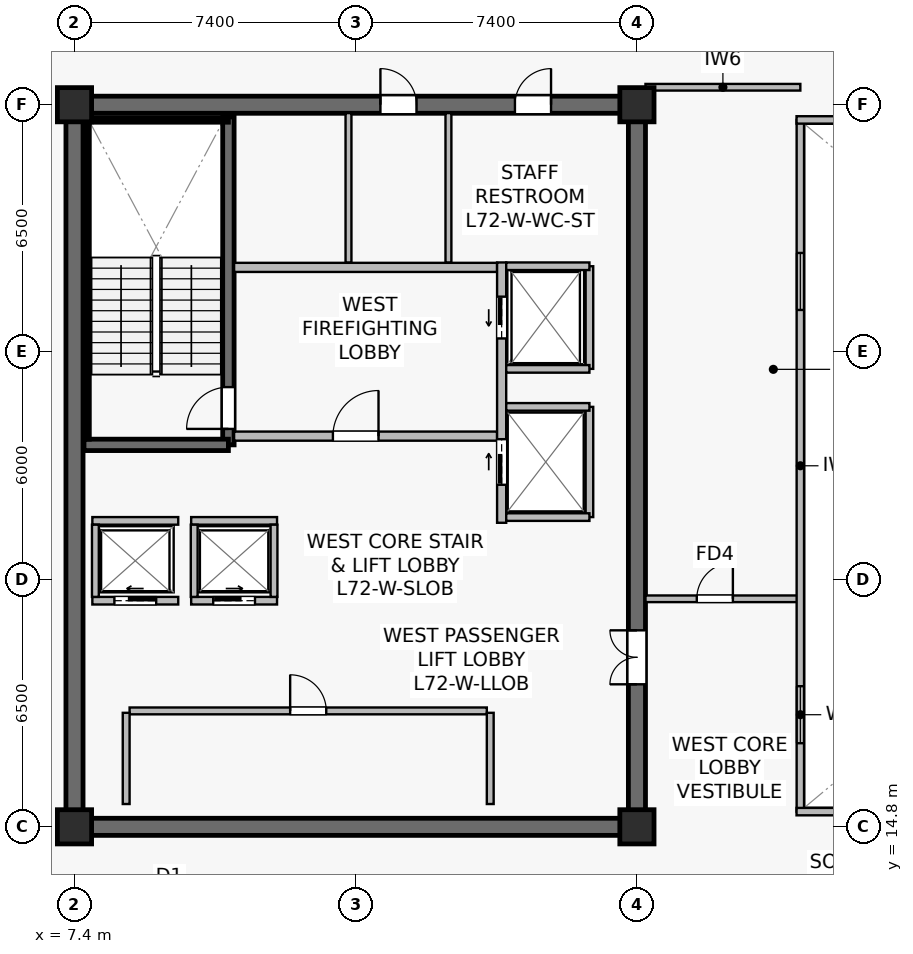
"""IFC4 building model, lengths in metres.
Left out: names, types, materials, properties, quantities, classifications, styles, units other than length and angle.
Written with IfcOpenShell. Run it as: python <this file> out.ifc"""

import sys

from ifc_helpers import new_model, si_unit, direction, frame, frame_2d, origin, origin_2d, place, context, subcontext, project, spatial, rectangle, extrude, source, transform, mapped, element, fill, save


model = new_model("IFC4")
c1 = context("Model", 3, precision=1e-05, world=origin(), true_north=direction((0.0, 1.0)))
c2 = subcontext(c1, "Body", "Model", "MODEL_VIEW")
j1 = project(units=[si_unit("LENGTHUNIT", "METRE"), si_unit("PLANEANGLEUNIT", "RADIAN")], contexts=[c1])
p1 = place(None, origin())
s1 = spatial("IfcSite", under=j1, at=p1, CompositionType="ELEMENT")
p2 = place(p1, origin())
s2 = spatial("IfcBuilding", under=s1, at=p2, CompositionType="ELEMENT")
p3 = place(p2, frame((0.0, 0.0, 301.8)))
s3 = spatial("IfcBuildingStorey", under=s2, at=p3, CompositionType="ELEMENT", Elevation=301.8)
p4 = place(p3, frame((7.175, 14.8, 0.0), z_axis=(0.0, 0.0, 1.0), x_axis=(1.0, 0.0, 0.0)))
e1 = element("IfcWall", 1, at=p4, inside=s3, PredefinedType="SHEAR", context=c2, shape_type="SweptSolid", body=[
    extrude(rectangle(XDim=15.25, YDim=0.45, at=frame_2d((7.625, 0.0))), origin(), (0.0, 0.0, 1.0), 3.9),
])
p5 = place(p3, frame((7.175, 33.8, 0.0), z_axis=(0.0, 0.0, 1.0), x_axis=(1.0, 0.0, 0.0)))
e2 = element("IfcWall", 2, at=p5, inside=s3, PredefinedType="SHEAR", context=c2, shape_type="SweptSolid", body=[
    extrude(rectangle(XDim=15.25, YDim=0.45, at=frame_2d((7.625, 0.0))), origin(), (0.0, 0.0, 1.0), 3.9),
])
p6 = place(p5, frame((8.275, 0.0, 0.0)))
e3 = element("IfcOpeningElement", 3, at=p6, cuts=e2, PredefinedType="OPENING", context=c2, shape_type="SweptSolid", body=[
    extrude(rectangle(XDim=0.95, YDim=2.15, at=frame_2d((0.475, 1.075))), frame((0.0, 0.235, 0.0), z_axis=(0.0, -1.0, 0.0), x_axis=(1.0, 0.0, 0.0)), (0.0, 0.0, 1.0), 0.47),
])
p7 = place(p5, frame((11.815, 0.0, 0.0)))
e4 = element("IfcOpeningElement", 4, at=p7, cuts=e2, PredefinedType="OPENING", context=c2, shape_type="SweptSolid", body=[
    extrude(rectangle(XDim=0.95, YDim=2.15, at=frame_2d((0.475, 1.075))), frame((0.0, 0.235, 0.0), z_axis=(0.0, -1.0, 0.0), x_axis=(1.0, 0.0, 0.0)), (0.0, 0.0, 1.0), 0.47),
])
p8 = place(p3, frame((7.4, 15.025, 0.0), z_axis=(0.0, 0.0, 1.0), x_axis=(0.0, 1.0, 0.0)))
e5 = element("IfcWall", 5, at=p8, inside=s3, PredefinedType="SHEAR", context=c2, shape_type="SweptSolid", body=[
    extrude(rectangle(XDim=18.55, YDim=0.45, at=frame_2d((9.275, 0.0))), origin(), (0.0, 0.0, 1.0), 3.9),
])
p9 = place(p3, frame((22.2, 15.025, 0.0), z_axis=(0.0, 0.0, 1.0), x_axis=(0.0, 1.0, 0.0)))
e6 = element("IfcWall", 6, at=p9, inside=s3, PredefinedType="SHEAR", context=c2, shape_type="SweptSolid", body=[
    extrude(rectangle(XDim=18.55, YDim=0.45, at=frame_2d((9.275, 0.0))), origin(), (0.0, 0.0, 1.0), 3.9),
])
p10 = place(p9, frame((3.525, 0.0, 0.0)))
e7 = element("IfcOpeningElement", 7, at=p10, cuts=e6, PredefinedType="OPENING", context=c2, shape_type="SweptSolid", body=[
    extrude(rectangle(XDim=1.42, YDim=2.2, at=frame_2d((0.71, 1.1))), frame((0.0, 0.235, 0.0), z_axis=(0.0, -1.0, 0.0), x_axis=(1.0, 0.0, 0.0)), (0.0, 0.0, 1.0), 0.47),
])
p11 = place(p3, frame((11.45, 24.85, 0.0), z_axis=(0.0, 0.0, 1.0), x_axis=(0.0, 1.0, 0.0)))
e8 = element("IfcWall", 8, at=p11, inside=s3, PredefinedType="SHEAR", context=c2, shape_type="SweptSolid", body=[
    extrude(rectangle(XDim=8.63, YDim=0.3, at=frame_2d((4.315, 0.0))), origin(), (0.0, 0.0, 1.0), 3.9),
])
p12 = place(p11, frame((0.42, 0.0, 0.0)))
e9 = element("IfcOpeningElement", 9, at=p12, cuts=e8, PredefinedType="OPENING", context=c2, shape_type="SweptSolid", body=[
    extrude(rectangle(XDim=1.1, YDim=2.15, at=frame_2d((0.55, 1.075))), frame((0.0, 0.16, 0.0), z_axis=(0.0, -1.0, 0.0), x_axis=(1.0, 0.0, 0.0)), (0.0, 0.0, 1.0), 0.32),
])
p13 = place(p3, frame((7.65, 24.85, 0.0), z_axis=(0.0, 0.0, 1.0), x_axis=(1.0, 0.0, 0.0)))
e10 = element("IfcWall", 10, at=p13, inside=s3, PredefinedType="SHEAR", context=c2, shape_type="SweptSolid", body=[
    extrude(rectangle(XDim=3.8, YDim=0.3, at=frame_2d((1.9, 0.0))), origin(), (0.0, 0.0, 1.0), 3.9),
])
p14 = place(p3, frame((7.73, 33.4, 0.0), z_axis=(0.0, 0.0, 1.0), x_axis=(1.0, 0.0, 0.0)))
e11 = element("IfcWall", 11, at=p14, inside=s3, PredefinedType="SOLIDWALL", context=c2, shape_type="SweptSolid", body=[
    extrude(rectangle(XDim=3.72, YDim=0.12, at=frame_2d((1.86, 0.0))), origin(), (0.0, 0.0, 1.0), 3.9),
])
p15 = place(p3, frame((7.73, 25.0, 0.0), z_axis=(0.0, 0.0, 1.0), x_axis=(0.0, 1.0, 0.0)))
e12 = element("IfcWall", 12, at=p15, inside=s3, PredefinedType="SOLIDWALL", context=c2, shape_type="SweptSolid", body=[
    extrude(rectangle(XDim=8.32, YDim=0.12, at=frame_2d((4.16, 0.0))), origin(), (0.0, 0.0, 1.0), 3.9),
])
m1 = source(origin(), c2, "Body", "SweptSolid", [
    extrude(rectangle(XDim=0.9, YDim=0.9, at=origin_2d()), origin(), (0.0, 0.0, 1.0), 4.2),
])
for number, where, z_axis, x_axis in (
    (13, (7.4, 14.8, 0.0), (0.0, 0.0, 1.0), (1.0, 0.0, 0.0)),
    (14, (22.2, 14.8, 0.0), (0.0, 0.0, 1.0), (1.0, 0.0, 0.0)),
    (15, (7.4, 33.8, 0.0), (0.0, 0.0, 1.0), (1.0, 0.0, 0.0)),
    (16, (22.2, 33.8, 0.0), (0.0, 0.0, 1.0), (1.0, 0.0, 0.0)),
):
    element("IfcColumn", number, at=place(p3, frame(where, z_axis=z_axis, x_axis=x_axis)), inside=s3, PredefinedType="COLUMN", context=c2, shape_type="MappedRepresentation", body=[
        mapped(m1, transform((0.0, 0.0, 0.0), scale=1.0)),
    ])
p16 = place(p3, frame((11.6, 25.08, 0.0), z_axis=(0.0, 0.0, 1.0), x_axis=(1.0, 0.0, 0.0)))
e17 = element("IfcWall", 17, at=p16, inside=s3, PredefinedType="SOLIDWALL", context=c2, shape_type="SweptSolid", body=[
    extrude(rectangle(XDim=6.92, YDim=0.24, at=frame_2d((3.46, 0.0))), origin(), (0.0, 0.0, 1.0), 3.297),
])
p17 = place(p16, frame((2.6, 0.0, 0.0)))
e18 = element("IfcOpeningElement", 18, at=p17, cuts=e17, PredefinedType="OPENING", context=c2, shape_type="SweptSolid", body=[
    extrude(rectangle(XDim=1.2, YDim=2.16, at=frame_2d((0.6, 1.08))), frame((0.0, 0.13, 0.0), z_axis=(0.0, -1.0, 0.0), x_axis=(1.0, 0.0, 0.0)), (0.0, 0.0, 1.0), 0.26),
])
p18 = place(p3, frame((11.6, 29.52, 0.0), z_axis=(0.0, 0.0, 1.0), x_axis=(1.0, 0.0, 0.0)))
e19 = element("IfcWall", 19, at=p18, inside=s3, PredefinedType="SOLIDWALL", context=c2, shape_type="SweptSolid", body=[
    extrude(rectangle(XDim=6.92, YDim=0.24, at=frame_2d((3.46, 0.0))), origin(), (0.0, 0.0, 1.0), 3.297),
])
p19 = place(p3, frame((18.64, 22.8, 0.0), z_axis=(0.0, 0.0, 1.0), x_axis=(0.0, 1.0, 0.0)))
e20 = element("IfcWall", 20, at=p19, inside=s3, PredefinedType="SOLIDWALL", context=c2, shape_type="SweptSolid", body=[
    extrude(rectangle(XDim=6.85, YDim=0.24, at=frame_2d((3.425, 0.0))), origin(), (0.0, 0.0, 1.0), 3.035),
])
p20 = place(p19, frame((4.85, 0.0, 0.0)))
e21 = element("IfcOpeningElement", 21, at=p20, cuts=e20, PredefinedType="OPENING", context=c2, shape_type="SweptSolid", body=[
    extrude(rectangle(XDim=1.1, YDim=2.22, at=frame_2d((0.55, 1.11))), frame((0.0, 0.13, 0.0), z_axis=(0.0, -1.0, 0.0), x_axis=(1.0, 0.0, 0.0)), (0.0, 0.0, 1.0), 0.26),
])
p21 = place(p19, frame((1.0, 0.0, 0.0)))
e22 = element("IfcOpeningElement", 22, at=p21, cuts=e20, PredefinedType="OPENING", context=c2, shape_type="SweptSolid", body=[
    extrude(rectangle(XDim=1.2, YDim=2.22, at=frame_2d((0.6, 1.11))), frame((0.0, 0.13, 0.0), z_axis=(0.0, -1.0, 0.0), x_axis=(1.0, 0.0, 0.0)), (0.0, 0.0, 1.0), 0.26),
])
p22 = place(p3, frame((7.87, 20.75, 0.0), z_axis=(0.0, 0.0, 1.0), x_axis=(1.0, 0.0, 0.0)))
e23 = element("IfcWall", 23, at=p22, inside=s3, PredefinedType="SOLIDWALL", context=c2, shape_type="SweptSolid", body=[
    extrude(rectangle(XDim=2.26, YDim=0.2, at=frame_2d((1.13, 0.0))), origin(), (0.0, 0.0, 1.0), 3.9),
])
p23 = place(p22, frame((0.58, 0.0, 0.0)))
e24 = element("IfcOpeningElement", 24, at=p23, cuts=e23, PredefinedType="OPENING", context=c2, shape_type="SweptSolid", body=[
    extrude(rectangle(XDim=1.1, YDim=2.22, at=frame_2d((0.55, 1.11))), frame((0.0, 0.11, 0.0), z_axis=(0.0, -1.0, 0.0), x_axis=(1.0, 0.0, 0.0)), (0.0, 0.0, 1.0), 0.22),
])
p24 = place(p3, frame((7.87, 22.85, 0.0), z_axis=(0.0, 0.0, 1.0), x_axis=(1.0, 0.0, 0.0)))
e25 = element("IfcWall", 25, at=p24, inside=s3, PredefinedType="SOLIDWALL", context=c2, shape_type="SweptSolid", body=[
    extrude(rectangle(XDim=2.26, YDim=0.2, at=frame_2d((1.13, 0.0))), origin(), (0.0, 0.0, 1.0), 3.9),
])
p25 = place(p3, frame((7.95, 20.85, 0.0), z_axis=(0.0, 0.0, 1.0), x_axis=(0.0, 1.0, 0.0)))
e26 = element("IfcWall", 26, at=p25, inside=s3, PredefinedType="SOLIDWALL", context=c2, shape_type="SweptSolid", body=[
    extrude(rectangle(XDim=1.9, YDim=0.18, at=frame_2d((0.95, 0.0))), origin(), (0.0, 0.0, 1.0), 3.9),
])
p26 = place(p3, frame((10.47, 20.75, 0.0), z_axis=(0.0, 0.0, 1.0), x_axis=(1.0, 0.0, 0.0)))
e27 = element("IfcWall", 27, at=p26, inside=s3, PredefinedType="SOLIDWALL", context=c2, shape_type="SweptSolid", body=[
    extrude(rectangle(XDim=2.26, YDim=0.2, at=frame_2d((1.13, 0.0))), origin(), (0.0, 0.0, 1.0), 3.9),
])
p27 = place(p26, frame((0.58, 0.0, 0.0)))
e28 = element("IfcOpeningElement", 28, at=p27, cuts=e27, PredefinedType="OPENING", context=c2, shape_type="SweptSolid", body=[
    extrude(rectangle(XDim=1.1, YDim=2.22, at=frame_2d((0.55, 1.11))), frame((0.0, 0.11, 0.0), z_axis=(0.0, -1.0, 0.0), x_axis=(1.0, 0.0, 0.0)), (0.0, 0.0, 1.0), 0.22),
])
p28 = place(p3, frame((10.47, 22.85, 0.0), z_axis=(0.0, 0.0, 1.0), x_axis=(1.0, 0.0, 0.0)))
e29 = element("IfcWall", 29, at=p28, inside=s3, PredefinedType="SOLIDWALL", context=c2, shape_type="SweptSolid", body=[
    extrude(rectangle(XDim=2.26, YDim=0.2, at=frame_2d((1.13, 0.0))), origin(), (0.0, 0.0, 1.0), 3.9),
])
for number, where, z_axis, x_axis in (
    (30, (10.55, 20.85, 0.0), (0.0, 0.0, 1.0), (0.0, 1.0, 0.0)),
    (31, (12.65, 20.85, 0.0), (0.0, 0.0, 1.0), (0.0, 1.0, 0.0)),
):
    element("IfcWall", number, at=place(p3, frame(where, z_axis=z_axis, x_axis=x_axis)), inside=s3, PredefinedType="SOLIDWALL", context=c2, shape_type="SweptSolid", body=[
        extrude(rectangle(XDim=1.9, YDim=0.18, at=frame_2d((0.95, 0.0))), origin(), (0.0, 0.0, 1.0), 3.9),
    ])
p29 = place(p3, frame((20.95, 26.85, 0.0), z_axis=(0.0, 0.0, 1.0), x_axis=(0.0, 1.0, 0.0)))
e32 = element("IfcWall", 32, at=p29, inside=s3, PredefinedType="SOLIDWALL", context=c2, shape_type="SweptSolid", body=[
    extrude(rectangle(XDim=2.7, YDim=0.2, at=frame_2d((1.35, 0.0))), origin(), (0.0, 0.0, 1.0), 3.9),
])
p30 = place(p3, frame((18.76, 29.55, 0.0), z_axis=(0.0, 0.0, 1.0), x_axis=(1.0, 0.0, 0.0)))
e33 = element("IfcWall", 33, at=p30, inside=s3, PredefinedType="SOLIDWALL", context=c2, shape_type="SweptSolid", body=[
    extrude(rectangle(XDim=2.19, YDim=0.2, at=frame_2d((1.095, 0.0))), origin(), (0.0, 0.0, 1.0), 3.9),
])
p31 = place(p3, frame((18.76, 26.85, 0.0), z_axis=(0.0, 0.0, 1.0), x_axis=(1.0, 0.0, 0.0)))
e34 = element("IfcWall", 34, at=p31, inside=s3, PredefinedType="SOLIDWALL", context=c2, shape_type="SweptSolid", body=[
    extrude(rectangle(XDim=2.19, YDim=0.2, at=frame_2d((1.095, 0.0))), origin(), (0.0, 0.0, 1.0), 3.297),
])
p32 = place(p3, frame((20.95, 22.95, 0.0), z_axis=(0.0, 0.0, 1.0), x_axis=(0.0, 1.0, 0.0)))
e35 = element("IfcWall", 35, at=p32, inside=s3, PredefinedType="SOLIDWALL", context=c2, shape_type="SweptSolid", body=[
    extrude(rectangle(XDim=2.9, YDim=0.2, at=frame_2d((1.45, 0.0))), origin(), (0.0, 0.0, 1.0), 3.035),
])
for number, where, z_axis, x_axis in (
    (36, (18.76, 25.85, 0.0), (0.0, 0.0, 1.0), (1.0, 0.0, 0.0)),
    (37, (18.76, 22.95, 0.0), (0.0, 0.0, 1.0), (1.0, 0.0, 0.0)),
):
    element("IfcWall", number, at=place(p3, frame(where, z_axis=z_axis, x_axis=x_axis)), inside=s3, PredefinedType="SOLIDWALL", context=c2, shape_type="SweptSolid", body=[
        extrude(rectangle(XDim=2.19, YDim=0.2, at=frame_2d((1.095, 0.0))), origin(), (0.0, 0.0, 1.0), 3.9),
    ])
p33 = place(p3, frame((8.85, 17.85, 0.0), z_axis=(0.0, 0.0, 1.0), x_axis=(1.0, 0.0, 0.0)))
e38 = element("IfcWall", 38, at=p33, inside=s3, PredefinedType="SOLIDWALL", context=c2, shape_type="SweptSolid", body=[
    extrude(rectangle(XDim=9.4, YDim=0.18, at=frame_2d((4.7, 0.0))), origin(), (0.0, 0.0, 1.0), 3.297),
])
p34 = place(p33, frame((4.225, 0.0, 0.0)))
e39 = element("IfcOpeningElement", 39, at=p34, cuts=e38, PredefinedType="OPENING", context=c2, shape_type="SweptSolid", body=[
    extrude(rectangle(XDim=0.95, YDim=2.15, at=frame_2d((0.475, 1.075))), frame((0.0, 0.1, 0.0), z_axis=(0.0, -1.0, 0.0), x_axis=(1.0, 0.0, 0.0)), (0.0, 0.0, 1.0), 0.2),
])
for number, where, z_axis, x_axis in (
    (40, (18.34, 15.4, 0.0), (0.0, 0.0, 1.0), (0.0, 1.0, 0.0)),
    (41, (8.76, 15.4, 0.0), (0.0, 0.0, 1.0), (0.0, 1.0, 0.0)),
):
    element("IfcWall", number, at=place(p3, frame(where, z_axis=z_axis, x_axis=x_axis)), inside=s3, PredefinedType="SOLIDWALL", context=c2, shape_type="SweptSolid", body=[
        extrude(rectangle(XDim=2.4, YDim=0.18, at=frame_2d((1.2, 0.0))), origin(), (0.0, 0.0, 1.0), 3.9),
    ])
p35 = place(p3, frame((14.61, 29.65, 0.0), z_axis=(0.0, 0.0, 1.0), x_axis=(0.0, 1.0, 0.0)))
e42 = element("IfcWall", 42, at=p35, inside=s3, PredefinedType="PLUMBINGWALL", context=c2, shape_type="SweptSolid", body=[
    extrude(rectangle(XDim=3.93, YDim=0.155, at=frame_2d((1.965, 0.0))), origin(), (0.0, 0.0, 1.0), 3.297),
])
p36 = place(p3, frame((17.24, 29.65, 0.0), z_axis=(0.0, 0.0, 1.0), x_axis=(0.0, 1.0, 0.0)))
e43 = element("IfcWall", 43, at=p36, inside=s3, PredefinedType="PLUMBINGWALL", context=c2, shape_type="SweptSolid", body=[
    extrude(rectangle(XDim=3.93, YDim=0.155, at=frame_2d((1.965, 0.0))), origin(), (0.0, 0.0, 1.0), 3.9),
])
p37 = place(p3, frame((22.425, 34.26, 0.0), z_axis=(0.0, 0.0, 1.0), x_axis=(1.0, 0.0, 0.0)))
e44 = element("IfcWall", 44, at=p37, inside=s3, PredefinedType="PARTITIONING", context=c2, shape_type="SweptSolid", body=[
    extrude(rectangle(XDim=4.075, YDim=0.175, at=frame_2d((2.038, 0.0))), origin(), (0.0, 0.0, 1.0), 3.635),
])
p38 = place(p3, frame((22.425, 20.8, 0.0), z_axis=(0.0, 0.0, 1.0), x_axis=(1.0, 0.0, 0.0)))
e45 = element("IfcWall", 45, at=p38, inside=s3, PredefinedType="PARTITIONING", context=c2, shape_type="SweptSolid", body=[
    extrude(rectangle(XDim=4.075, YDim=0.175, at=frame_2d((2.038, 0.0))), origin(), (0.0, 0.0, 1.0), 3.9),
])
p39 = place(p38, frame((1.35, 0.0, 0.0)))
e46 = element("IfcOpeningElement", 46, at=p39, cuts=e45, PredefinedType="OPENING", context=c2, shape_type="SweptSolid", body=[
    extrude(rectangle(XDim=0.95, YDim=2.15, at=frame_2d((0.475, 1.075))), frame((0.0, 0.098, 0.0), z_axis=(0.0, -1.0, 0.0), x_axis=(1.0, 0.0, 0.0)), (0.0, 0.0, 1.0), 0.195),
])
p40 = place(p3, frame((26.5, 15.2, 0.0), z_axis=(0.0, 0.0, 1.0), x_axis=(0.0, 1.0, 0.0)))
e47 = element("IfcWall", 47, at=p40, inside=s3, PredefinedType="SOLIDWALL", context=c2, shape_type="SweptSolid", body=[
    extrude(rectangle(XDim=18.2, YDim=0.195, at=frame_2d((9.1, 0.0))), origin(), (0.0, 0.0, 1.0), 3.9),
])
p41 = place(p40, frame((1.8, 0.0, 0.9)))
e48 = element("IfcOpeningElement", 48, at=p41, cuts=e47, PredefinedType="OPENING", context=c2, shape_type="SweptSolid", body=[
    extrude(rectangle(XDim=1.5, YDim=1.4, at=frame_2d((0.75, 0.7))), frame((0.0, 0.107, 0.0), z_axis=(0.0, -1.0, 0.0), x_axis=(1.0, 0.0, 0.0)), (0.0, 0.0, 1.0), 0.215),
])
p42 = place(p40, frame((13.2, 0.0, 0.9)))
e49 = element("IfcOpeningElement", 49, at=p42, cuts=e47, PredefinedType="OPENING", context=c2, shape_type="SweptSolid", body=[
    extrude(rectangle(XDim=1.5, YDim=1.4, at=frame_2d((0.75, 0.7))), frame((0.0, 0.107, 0.0), z_axis=(0.0, -1.0, 0.0), x_axis=(1.0, 0.0, 0.0)), (0.0, 0.0, 1.0), 0.215),
])
for number, where, z_axis, x_axis in (
    (50, (26.4, 15.2, 0.0), (0.0, 0.0, 1.0), (1.0, 0.0, 0.0)),
    (51, (26.4, 33.4, 0.0), (0.0, 0.0, 1.0), (1.0, 0.0, 0.0)),
):
    element("IfcWall", number, at=place(p3, frame(where, z_axis=z_axis, x_axis=x_axis)), inside=s3, PredefinedType="SOLIDWALL", context=c2, shape_type="SweptSolid", body=[
        extrude(rectangle(XDim=22.0, YDim=0.195, at=frame_2d((11.0, 0.0))), origin(), (0.0, 0.0, 1.0), 3.9),
    ])
m2 = source(origin(), c2, "Body", "SweptSolid", [
    extrude(rectangle(XDim=1.5, YDim=1.4, at=frame_2d((0.75, 0.7))), frame((0.0, 0.03, 0.0), z_axis=(0.0, -1.0, 0.0), x_axis=(1.0, 0.0, 0.0)), (0.0, 0.0, 1.0), 0.06),
])
p43 = place(p41, origin())
e52 = element("IfcWindow", 52, at=p43, inside=s3, PartitioningType="SINGLE_PANEL", PredefinedType="WINDOW", context=c2, shape_type="MappedRepresentation", body=[
    mapped(m2, transform((0.0, 0.0, 0.0), scale=1.0)),
])
fill(e48, e52)
p44 = place(p42, origin())
e53 = element("IfcWindow", 53, at=p44, inside=s3, PartitioningType="SINGLE_PANEL", PredefinedType="WINDOW", context=c2, shape_type="MappedRepresentation", body=[
    mapped(m2, transform((0.0, 0.0, 0.0), scale=1.0)),
])
fill(e49, e53)
m3 = source(origin(), c2, "Body", "SweptSolid", [
    extrude(rectangle(XDim=1.1, YDim=2.15, at=frame_2d((0.55, 1.075))), frame((0.0, 0.025, 0.0), z_axis=(0.0, -1.0, 0.0), x_axis=(1.0, 0.0, 0.0)), (0.0, 0.0, 1.0), 0.05),
])
p45 = place(p12, origin())
e54 = element("IfcDoor", 54, at=p45, inside=s3, OperationType="SINGLE_SWING_LEFT", PredefinedType="DOOR", context=c2, shape_type="MappedRepresentation", body=[
    mapped(m3, transform((0.0, 0.0, 0.0), scale=1.0)),
])
fill(e9, e54)
m4 = source(origin(), c2, "Body", "SweptSolid", [
    extrude(rectangle(XDim=1.2, YDim=2.16, at=frame_2d((0.6, 1.08))), frame((0.0, 0.025, 0.0), z_axis=(0.0, -1.0, 0.0), x_axis=(1.0, 0.0, 0.0)), (0.0, 0.0, 1.0), 0.05),
])
p46 = place(p17, origin())
e55 = element("IfcDoor", 55, at=p46, inside=s3, OperationType="SINGLE_SWING_RIGHT", PredefinedType="DOOR", context=c2, shape_type="MappedRepresentation", body=[
    mapped(m4, transform((0.0, 0.0, 0.0), scale=1.0)),
])
fill(e18, e55)
m5 = source(origin(), c2, "Body", "SweptSolid", [
    extrude(rectangle(XDim=1.1, YDim=2.22, at=frame_2d((0.55, 1.11))), frame((0.0, 0.025, 0.0), z_axis=(0.0, -1.0, 0.0), x_axis=(1.0, 0.0, 0.0)), (0.0, 0.0, 1.0), 0.05),
])
p47 = place(p23, origin())
e56 = element("IfcDoor", 56, at=p47, inside=s3, OperationType="SLIDING_TO_LEFT", PredefinedType="USERDEFINED", context=c2, shape_type="MappedRepresentation", body=[
    mapped(m5, transform((0.0, 0.0, 0.0), scale=1.0)),
])
fill(e24, e56)
p48 = place(p27, origin())
e57 = element("IfcDoor", 57, at=p48, inside=s3, OperationType="SLIDING_TO_RIGHT", PredefinedType="USERDEFINED", context=c2, shape_type="MappedRepresentation", body=[
    mapped(m5, transform((0.0, 0.0, 0.0), scale=1.0)),
])
fill(e28, e57)
p49 = place(p20, origin())
e58 = element("IfcDoor", 58, at=p49, inside=s3, OperationType="SLIDING_TO_LEFT", PredefinedType="USERDEFINED", context=c2, shape_type="MappedRepresentation", body=[
    mapped(m5, transform((0.0, 0.0, 0.0), scale=1.0)),
])
fill(e21, e58)
m6 = source(origin(), c2, "Body", "SweptSolid", [
    extrude(rectangle(XDim=1.2, YDim=2.22, at=frame_2d((0.6, 1.11))), frame((0.0, 0.025, 0.0), z_axis=(0.0, -1.0, 0.0), x_axis=(1.0, 0.0, 0.0)), (0.0, 0.0, 1.0), 0.05),
])
p50 = place(p21, origin())
e59 = element("IfcDoor", 59, at=p50, inside=s3, OperationType="SLIDING_TO_RIGHT", PredefinedType="USERDEFINED", context=c2, shape_type="MappedRepresentation", body=[
    mapped(m6, transform((0.0, 0.0, 0.0), scale=1.0)),
])
fill(e22, e59)
m7 = source(origin(), c2, "Body", "SweptSolid", [
    extrude(rectangle(XDim=0.95, YDim=2.15, at=frame_2d((0.475, 1.075))), frame((0.0, 0.025, 0.0), z_axis=(0.0, -1.0, 0.0), x_axis=(1.0, 0.0, 0.0)), (0.0, 0.0, 1.0), 0.05),
])
p51 = place(p34, origin())
e60 = element("IfcDoor", 60, at=p51, inside=s3, OperationType="SINGLE_SWING_LEFT", PredefinedType="DOOR", context=c2, shape_type="MappedRepresentation", body=[
    mapped(m7, transform((0.0, 0.0, 0.0), scale=1.0)),
])
fill(e39, e60)
m8 = source(origin(), c2, "Body", "SweptSolid", [
    extrude(rectangle(XDim=1.42, YDim=2.2, at=frame_2d((0.71, 1.1))), frame((0.0, 0.025, 0.0), z_axis=(0.0, -1.0, 0.0), x_axis=(1.0, 0.0, 0.0)), (0.0, 0.0, 1.0), 0.05),
])
p52 = place(p10, origin())
e61 = element("IfcDoor", 61, at=p52, inside=s3, OperationType="DOUBLE_DOOR_SINGLE_SWING", PredefinedType="DOOR", context=c2, shape_type="MappedRepresentation", body=[
    mapped(m8, transform((0.0, 0.0, 0.0), scale=1.0)),
])
fill(e7, e61)
p53 = place(p6, origin())
e62 = element("IfcDoor", 62, at=p53, inside=s3, OperationType="SINGLE_SWING_LEFT", PredefinedType="DOOR", context=c2, shape_type="MappedRepresentation", body=[
    mapped(m7, transform((0.0, 0.0, 0.0), scale=1.0)),
])
fill(e3, e62)
p54 = place(p7, origin())
e63 = element("IfcDoor", 63, at=p54, inside=s3, OperationType="SINGLE_SWING_RIGHT", PredefinedType="DOOR", context=c2, shape_type="MappedRepresentation", body=[
    mapped(m7, transform((0.0, 0.0, 0.0), scale=1.0)),
])
fill(e4, e63)
p55 = place(p39, origin())
e64 = element("IfcDoor", 64, at=p55, inside=s3, OperationType="SINGLE_SWING_RIGHT", PredefinedType="DOOR", context=c2, shape_type="MappedRepresentation", body=[
    mapped(m7, transform((0.0, 0.0, 0.0), scale=1.0)),
])
fill(e46, e64)
save(model, sys.argv[1])
